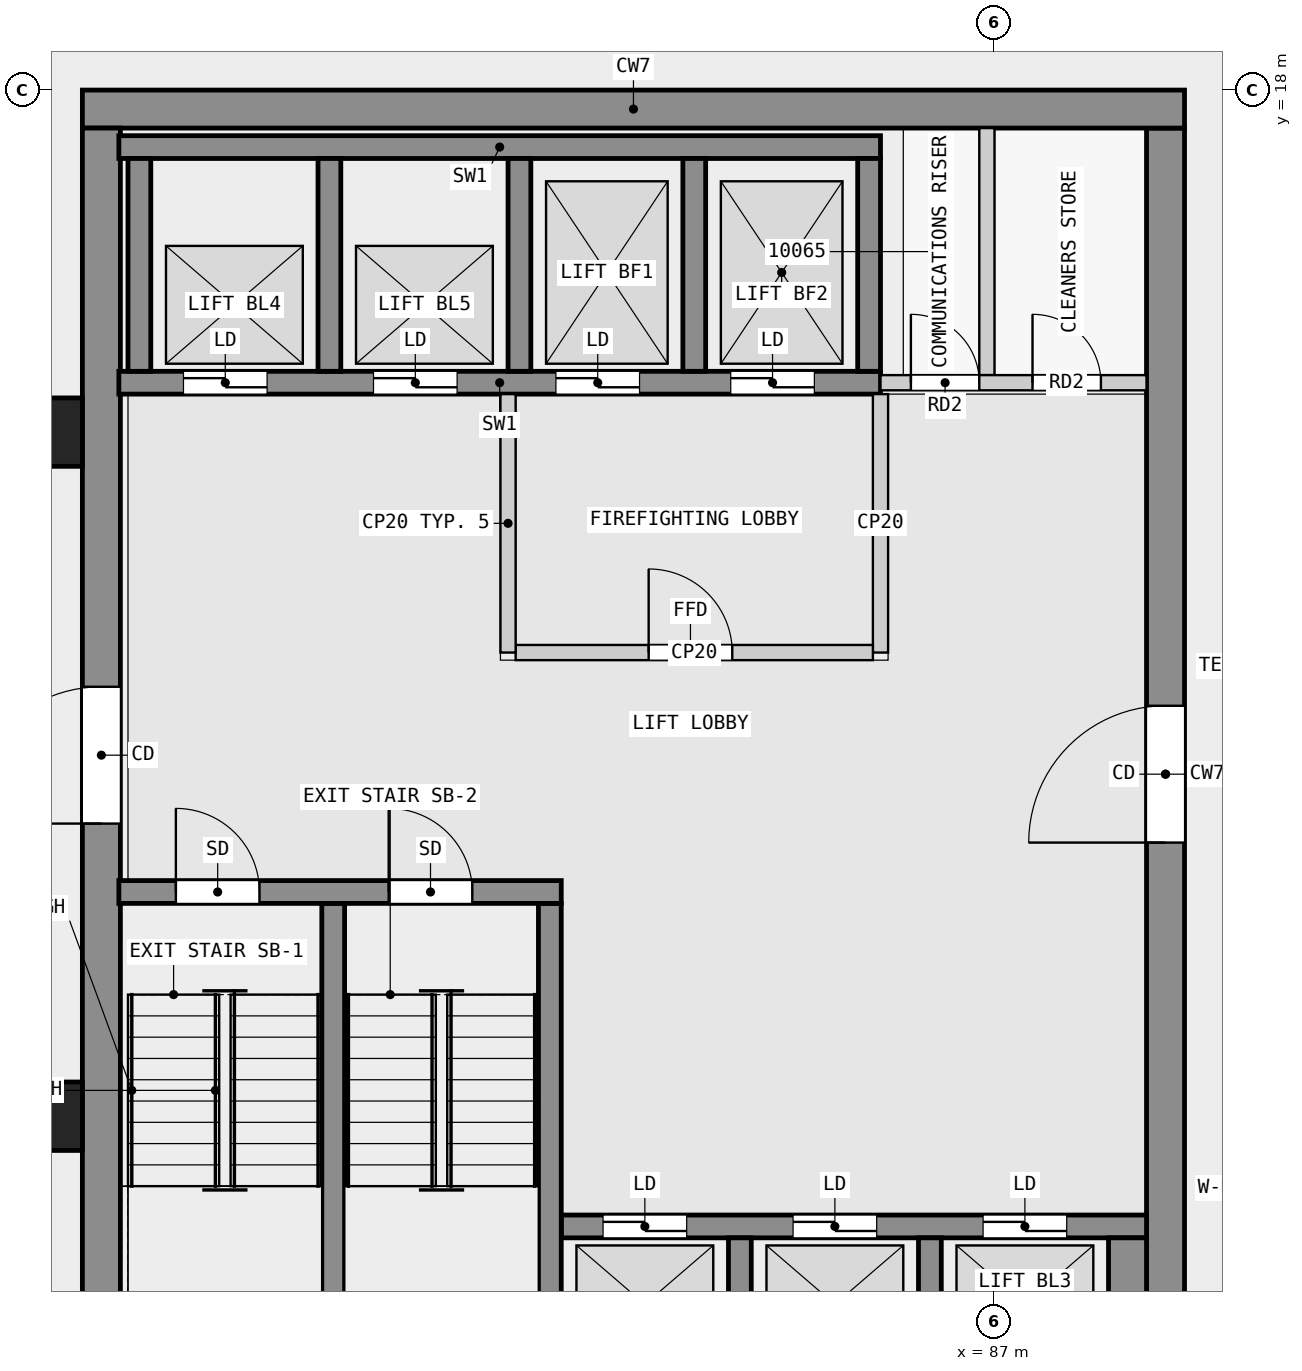
"""IFC4 building model, lengths in metres.
Left out: names, types, materials, properties, quantities, classifications, styles, units other than length and angle.
Written with IfcOpenShell. Run it as: python <this file> out.ifc"""

import sys

from ifc_helpers import new_model, si_unit, direction, frame, frame_2d, origin, origin_2d, place, context, subcontext, project, spatial, rectangle, extrude, element, fill, save


model = new_model("IFC4")
c1 = context("Model", 3, precision=1e-05, world=origin(), true_north=direction((0.0, 1.0)))
c2 = subcontext(c1, "Body", "Model", "MODEL_VIEW")
j1 = project(units=[si_unit("LENGTHUNIT", "METRE"), si_unit("PLANEANGLEUNIT", "RADIAN")], contexts=[c1])
p1 = place(None, origin())
s1 = spatial("IfcSite", under=j1, at=p1, CompositionType="ELEMENT")
p2 = place(p1, origin())
s2 = spatial("IfcBuilding", under=s1, at=p2, CompositionType="ELEMENT")
p3 = place(p2, frame((0.0, 0.0, 44.3)))
s3 = spatial("IfcBuildingStorey", under=s2, at=p3, CompositionType="ELEMENT", Elevation=44.3)
for number, where, z_axis, x_axis in (
    (1, (74.55, 13.5, 0.0), (0.0, 0.0, 1.0), (1.0, 0.0, 0.0)),
    (2, (74.55, 4.5, 0.0), (0.0, 0.0, 1.0), (1.0, 0.0, 0.0)),
):
    element("IfcColumn", number, at=place(p3, frame(where, z_axis=z_axis, x_axis=x_axis)), inside=s3, PredefinedType="COLUMN", context=c2, shape_type="SweptSolid", body=[
        extrude(rectangle(XDim=0.9, YDim=0.9, at=origin_2d()), origin(), (0.0, 0.0, 1.0), 3.5),
    ])
p4 = place(p3, frame((75.0, 17.75, 0.0), z_axis=(0.0, 0.0, 1.0), x_axis=(1.0, 0.0, 0.0)))
e3 = element("IfcWall", 3, at=p4, inside=s3, PredefinedType="SHEAR", context=c2, shape_type="SweptSolid", body=[
    extrude(rectangle(XDim=14.5, YDim=0.5, at=frame_2d((7.25, 0.0))), origin(), (0.0, 0.0, 1.0), 3.25),
])
p5 = place(p3, frame((75.25, 0.5, 0.0), z_axis=(0.0, 0.0, 1.0), x_axis=(0.0, 1.0, 0.0)))
e4 = element("IfcWall", 4, at=p5, inside=s3, PredefinedType="SHEAR", context=c2, shape_type="SweptSolid", body=[
    extrude(rectangle(XDim=17.0, YDim=0.5, at=frame_2d((8.5, 0.0))), origin(), (0.0, 0.0, 1.0), 3.25),
])
p6 = place(p5, frame((7.85, 0.0, 0.0)))
e5 = element("IfcOpeningElement", 5, at=p6, cuts=e4, PredefinedType="OPENING", context=c2, shape_type="SweptSolid", body=[
    extrude(rectangle(XDim=1.8, YDim=2.1, at=frame_2d((0.9, 1.05))), frame((0.0, 0.26, 0.0), z_axis=(0.0, -1.0, 0.0), x_axis=(1.0, 0.0, 0.0)), (0.0, 0.0, 1.0), 0.52),
])
p7 = place(p3, frame((89.25, 0.5, 0.0), z_axis=(0.0, 0.0, 1.0), x_axis=(0.0, 1.0, 0.0)))
e6 = element("IfcWall", 6, at=p7, inside=s3, PredefinedType="SHEAR", context=c2, shape_type="SweptSolid", body=[
    extrude(rectangle(XDim=17.0, YDim=0.5, at=frame_2d((8.5, 0.0))), origin(), (0.0, 0.0, 1.0), 3.25),
])
p8 = place(p7, frame((7.6, 0.0, 0.0)))
e7 = element("IfcOpeningElement", 7, at=p8, cuts=e6, PredefinedType="OPENING", context=c2, shape_type="SweptSolid", body=[
    extrude(rectangle(XDim=1.8, YDim=2.1, at=frame_2d((0.9, 1.05))), frame((0.0, 0.26, 0.0), z_axis=(0.0, -1.0, 0.0), x_axis=(1.0, 0.0, 0.0)), (0.0, 0.0, 1.0), 0.52),
])
p9 = place(p3, frame((75.48, 7.45, 0.0), z_axis=(0.0, 0.0, 1.0), x_axis=(1.0, 0.0, 0.0)))
e8 = element("IfcWall", 8, at=p9, inside=s3, PredefinedType="SHEAR", context=c2, shape_type="SweptSolid", body=[
    extrude(rectangle(XDim=5.82, YDim=0.3, at=frame_2d((2.91, 0.0))), origin(), (0.0, 0.0, 1.0), 3.25),
])
p10 = place(p9, frame((0.75, 0.0, 0.0)))
e9 = element("IfcOpeningElement", 9, at=p10, cuts=e8, PredefinedType="OPENING", context=c2, shape_type="SweptSolid", body=[
    extrude(rectangle(XDim=1.1, YDim=2.1, at=frame_2d((0.55, 1.05))), frame((0.0, 0.16, 0.0), z_axis=(0.0, -1.0, 0.0), x_axis=(1.0, 0.0, 0.0)), (0.0, 0.0, 1.0), 0.32),
])
p11 = place(p9, frame((3.55, 0.0, 0.0)))
e10 = element("IfcOpeningElement", 10, at=p11, cuts=e8, PredefinedType="OPENING", context=c2, shape_type="SweptSolid", body=[
    extrude(rectangle(XDim=1.1, YDim=2.1, at=frame_2d((0.55, 1.05))), frame((0.0, 0.16, 0.0), z_axis=(0.0, -1.0, 0.0), x_axis=(1.0, 0.0, 0.0)), (0.0, 0.0, 1.0), 0.32),
])
for number, where, z_axis, x_axis in (
    (11, (78.3, 0.9, 0.0), (0.0, 0.0, 1.0), (0.0, 1.0, 0.0)),
    (12, (81.15, 0.9, 0.0), (0.0, 0.0, 1.0), (0.0, 1.0, 0.0)),
):
    element("IfcWall", number, at=place(p3, frame(where, z_axis=z_axis, x_axis=x_axis)), inside=s3, PredefinedType="SHEAR", context=c2, shape_type="SweptSolid", body=[
        extrude(rectangle(XDim=6.4, YDim=0.3, at=frame_2d((3.2, 0.0))), origin(), (0.0, 0.0, 1.0), 3.25),
    ])
for number, where, z_axis, x_axis in (
    (13, (83.65, 0.9, 0.0), (0.0, 0.0, 1.0), (0.0, 1.0, 0.0)),
    (14, (86.15, 0.9, 0.0), (0.0, 0.0, 1.0), (0.0, 1.0, 0.0)),
):
    element("IfcWall", number, at=place(p3, frame(where, z_axis=z_axis, x_axis=x_axis)), inside=s3, PredefinedType="SHEAR", context=c2, shape_type="SweptSolid", body=[
        extrude(rectangle(XDim=2.0, YDim=0.3, at=frame_2d((1.0, 0.0))), origin(), (0.0, 0.0, 1.0), 3.25),
    ])
p12 = place(p3, frame((88.75, 0.9, 0.0), z_axis=(0.0, 0.0, 1.0), x_axis=(0.0, 1.0, 0.0)))
e15 = element("IfcWall", 15, at=p12, inside=s3, PredefinedType="SHEAR", context=c2, shape_type="SweptSolid", body=[
    extrude(rectangle(XDim=2.0, YDim=0.5, at=frame_2d((1.0, 0.0))), origin(), (0.0, 0.0, 1.0), 3.25),
])
p13 = place(p3, frame((81.3, 3.05, 0.0), z_axis=(0.0, 0.0, 1.0), x_axis=(1.0, 0.0, 0.0)))
e16 = element("IfcWall", 16, at=p13, inside=s3, PredefinedType="SHEAR", context=c2, shape_type="SweptSolid", body=[
    extrude(rectangle(XDim=7.7, YDim=0.3, at=frame_2d((3.85, 0.0))), origin(), (0.0, 0.0, 1.0), 3.25),
])
p14 = place(p13, frame((0.55, 0.0, 0.0)))
e17 = element("IfcOpeningElement", 17, at=p14, cuts=e16, PredefinedType="OPENING", context=c2, shape_type="SweptSolid", body=[
    extrude(rectangle(XDim=1.1, YDim=2.1, at=frame_2d((0.55, 1.05))), frame((0.0, 0.16, 0.0), z_axis=(0.0, -1.0, 0.0), x_axis=(1.0, 0.0, 0.0)), (0.0, 0.0, 1.0), 0.32),
])
p15 = place(p13, frame((3.05, 0.0, 0.0)))
e18 = element("IfcOpeningElement", 18, at=p15, cuts=e16, PredefinedType="OPENING", context=c2, shape_type="SweptSolid", body=[
    extrude(rectangle(XDim=1.1, YDim=2.1, at=frame_2d((0.55, 1.05))), frame((0.0, 0.16, 0.0), z_axis=(0.0, -1.0, 0.0), x_axis=(1.0, 0.0, 0.0)), (0.0, 0.0, 1.0), 0.32),
])
p16 = place(p13, frame((5.55, 0.0, 0.0)))
e19 = element("IfcOpeningElement", 19, at=p16, cuts=e16, PredefinedType="OPENING", context=c2, shape_type="SweptSolid", body=[
    extrude(rectangle(XDim=1.1, YDim=2.1, at=frame_2d((0.55, 1.05))), frame((0.0, 0.16, 0.0), z_axis=(0.0, -1.0, 0.0), x_axis=(1.0, 0.0, 0.0)), (0.0, 0.0, 1.0), 0.32),
])
p17 = place(p3, frame((75.48, 17.25, 0.0), z_axis=(0.0, 0.0, 1.0), x_axis=(1.0, 0.0, 0.0)))
e20 = element("IfcWall", 20, at=p17, inside=s3, PredefinedType="SHEAR", context=c2, shape_type="SweptSolid", body=[
    extrude(rectangle(XDim=10.02, YDim=0.3, at=frame_2d((5.01, 0.0))), origin(), (0.0, 0.0, 1.0), 3.25),
])
p18 = place(p3, frame((75.48, 14.15, 0.0), z_axis=(0.0, 0.0, 1.0), x_axis=(1.0, 0.0, 0.0)))
e21 = element("IfcWall", 21, at=p18, inside=s3, PredefinedType="SHEAR", context=c2, shape_type="SweptSolid", body=[
    extrude(rectangle(XDim=10.02, YDim=0.3, at=frame_2d((5.01, 0.0))), origin(), (0.0, 0.0, 1.0), 3.25),
])
p19 = place(p18, frame((0.85, 0.0, 0.0)))
e22 = element("IfcOpeningElement", 22, at=p19, cuts=e21, PredefinedType="OPENING", context=c2, shape_type="SweptSolid", body=[
    extrude(rectangle(XDim=1.1, YDim=2.1, at=frame_2d((0.55, 1.05))), frame((0.0, 0.16, 0.0), z_axis=(0.0, -1.0, 0.0), x_axis=(1.0, 0.0, 0.0)), (0.0, 0.0, 1.0), 0.32),
])
p20 = place(p18, frame((3.35, 0.0, 0.0)))
e23 = element("IfcOpeningElement", 23, at=p20, cuts=e21, PredefinedType="OPENING", context=c2, shape_type="SweptSolid", body=[
    extrude(rectangle(XDim=1.1, YDim=2.1, at=frame_2d((0.55, 1.05))), frame((0.0, 0.16, 0.0), z_axis=(0.0, -1.0, 0.0), x_axis=(1.0, 0.0, 0.0)), (0.0, 0.0, 1.0), 0.32),
])
p21 = place(p18, frame((5.75, 0.0, 0.0)))
e24 = element("IfcOpeningElement", 24, at=p21, cuts=e21, PredefinedType="OPENING", context=c2, shape_type="SweptSolid", body=[
    extrude(rectangle(XDim=1.1, YDim=2.1, at=frame_2d((0.55, 1.05))), frame((0.0, 0.16, 0.0), z_axis=(0.0, -1.0, 0.0), x_axis=(1.0, 0.0, 0.0)), (0.0, 0.0, 1.0), 0.32),
])
p22 = place(p18, frame((8.05, 0.0, 0.0)))
e25 = element("IfcOpeningElement", 25, at=p22, cuts=e21, PredefinedType="OPENING", context=c2, shape_type="SweptSolid", body=[
    extrude(rectangle(XDim=1.1, YDim=2.1, at=frame_2d((0.55, 1.05))), frame((0.0, 0.16, 0.0), z_axis=(0.0, -1.0, 0.0), x_axis=(1.0, 0.0, 0.0)), (0.0, 0.0, 1.0), 0.32),
])
for number, where, z_axis, x_axis in (
    (26, (75.75, 14.3, 0.0), (0.0, 0.0, 1.0), (0.0, 1.0, 0.0)),
    (27, (78.25, 14.3, 0.0), (0.0, 0.0, 1.0), (0.0, 1.0, 0.0)),
    (28, (80.75, 14.3, 0.0), (0.0, 0.0, 1.0), (0.0, 1.0, 0.0)),
    (29, (83.05, 14.3, 0.0), (0.0, 0.0, 1.0), (0.0, 1.0, 0.0)),
    (30, (85.35, 14.3, 0.0), (0.0, 0.0, 1.0), (0.0, 1.0, 0.0)),
):
    element("IfcWall", number, at=place(p3, frame(where, z_axis=z_axis, x_axis=x_axis)), inside=s3, PredefinedType="SHEAR", context=c2, shape_type="SweptSolid", body=[
        extrude(rectangle(XDim=2.8, YDim=0.3, at=frame_2d((1.4, 0.0))), origin(), (0.0, 0.0, 1.0), 3.25),
    ])
p23 = place(p3, frame((80.6, 10.6, 0.0), z_axis=(0.0, 0.0, 1.0), x_axis=(0.0, 1.0, 0.0)))
e31 = element("IfcWall", 31, at=p23, inside=s3, PredefinedType="PARTITIONING", context=c2, shape_type="SweptSolid", body=[
    extrude(rectangle(XDim=3.4, YDim=0.2, at=frame_2d((1.7, 0.0))), origin(), (0.0, 0.0, 1.0), 3.25),
])
p24 = place(p3, frame((80.7, 10.6, 0.0), z_axis=(0.0, 0.0, 1.0), x_axis=(1.0, 0.0, 0.0)))
e32 = element("IfcWall", 32, at=p24, inside=s3, PredefinedType="PARTITIONING", context=c2, shape_type="SweptSolid", body=[
    extrude(rectangle(XDim=4.7, YDim=0.2, at=frame_2d((2.35, 0.0))), origin(), (0.0, 0.0, 1.0), 3.25),
])
p25 = place(p24, frame((1.75, 0.0, 0.0)))
e33 = element("IfcOpeningElement", 33, at=p25, cuts=e32, PredefinedType="OPENING", context=c2, shape_type="SweptSolid", body=[
    extrude(rectangle(XDim=1.1, YDim=2.1, at=frame_2d((0.55, 1.05))), frame((0.0, 0.11, 0.0), z_axis=(0.0, -1.0, 0.0), x_axis=(1.0, 0.0, 0.0)), (0.0, 0.0, 1.0), 0.22),
])
p26 = place(p3, frame((85.5, 10.6, 0.0), z_axis=(0.0, 0.0, 1.0), x_axis=(0.0, 1.0, 0.0)))
e34 = element("IfcWall", 34, at=p26, inside=s3, PredefinedType="PARTITIONING", context=c2, shape_type="SweptSolid", body=[
    extrude(rectangle(XDim=3.4, YDim=0.2, at=frame_2d((1.7, 0.0))), origin(), (0.0, 0.0, 1.0), 3.25),
])
p27 = place(p3, frame((85.5, 14.15, 0.0), z_axis=(0.0, 0.0, 1.0), x_axis=(1.0, 0.0, 0.0)))
e35 = element("IfcWall", 35, at=p27, inside=s3, PredefinedType="PARTITIONING", context=c2, shape_type="SweptSolid", body=[
    extrude(rectangle(XDim=3.5, YDim=0.2, at=frame_2d((1.75, 0.0))), origin(), (0.0, 0.0, 1.0), 3.25),
])
p28 = place(p27, frame((0.4, 0.0, 0.0)))
e36 = element("IfcOpeningElement", 36, at=p28, cuts=e35, PredefinedType="OPENING", context=c2, shape_type="SweptSolid", body=[
    extrude(rectangle(XDim=0.9, YDim=2.1, at=frame_2d((0.45, 1.05))), frame((0.0, 0.11, 0.0), z_axis=(0.0, -1.0, 0.0), x_axis=(1.0, 0.0, 0.0)), (0.0, 0.0, 1.0), 0.22),
])
p29 = place(p27, frame((2.0, 0.0, 0.0)))
e37 = element("IfcOpeningElement", 37, at=p29, cuts=e35, PredefinedType="OPENING", context=c2, shape_type="SweptSolid", body=[
    extrude(rectangle(XDim=0.9, YDim=2.1, at=frame_2d((0.45, 1.05))), frame((0.0, 0.11, 0.0), z_axis=(0.0, -1.0, 0.0), x_axis=(1.0, 0.0, 0.0)), (0.0, 0.0, 1.0), 0.22),
])
p30 = place(p3, frame((86.9, 14.25, 0.0), z_axis=(0.0, 0.0, 1.0), x_axis=(0.0, 1.0, 0.0)))
e38 = element("IfcWall", 38, at=p30, inside=s3, PredefinedType="PARTITIONING", context=c2, shape_type="SweptSolid", body=[
    extrude(rectangle(XDim=3.25, YDim=0.2, at=frame_2d((1.625, 0.0))), origin(), (0.0, 0.0, 1.0), 3.25),
])
p31 = place(p25, origin())
e39 = element("IfcDoor", 39, at=p31, inside=s3, OperationType="SINGLE_SWING_LEFT", PredefinedType="DOOR", context=c2, shape_type="SweptSolid", body=[
    extrude(rectangle(XDim=1.1, YDim=2.1, at=frame_2d((0.55, 1.05))), frame((0.0, 0.025, 0.0), z_axis=(0.0, -1.0, 0.0), x_axis=(1.0, 0.0, 0.0)), (0.0, 0.0, 1.0), 0.05),
])
fill(e33, e39)
p32 = place(p14, origin())
e40 = element("IfcDoor", 40, at=p32, inside=s3, OperationType="DOUBLE_DOOR_SLIDING", PredefinedType="DOOR", context=c2, shape_type="SweptSolid", body=[
    extrude(rectangle(XDim=1.1, YDim=2.1, at=frame_2d((0.55, 1.05))), frame((0.0, 0.025, 0.0), z_axis=(0.0, -1.0, 0.0), x_axis=(1.0, 0.0, 0.0)), (0.0, 0.0, 1.0), 0.05),
])
fill(e17, e40)
p33 = place(p15, origin())
e41 = element("IfcDoor", 41, at=p33, inside=s3, OperationType="DOUBLE_DOOR_SLIDING", PredefinedType="DOOR", context=c2, shape_type="SweptSolid", body=[
    extrude(rectangle(XDim=1.1, YDim=2.1, at=frame_2d((0.55, 1.05))), frame((0.0, 0.025, 0.0), z_axis=(0.0, -1.0, 0.0), x_axis=(1.0, 0.0, 0.0)), (0.0, 0.0, 1.0), 0.05),
])
fill(e18, e41)
p34 = place(p16, origin())
e42 = element("IfcDoor", 42, at=p34, inside=s3, OperationType="DOUBLE_DOOR_SLIDING", PredefinedType="DOOR", context=c2, shape_type="SweptSolid", body=[
    extrude(rectangle(XDim=1.1, YDim=2.1, at=frame_2d((0.55, 1.05))), frame((0.0, 0.025, 0.0), z_axis=(0.0, -1.0, 0.0), x_axis=(1.0, 0.0, 0.0)), (0.0, 0.0, 1.0), 0.05),
])
fill(e19, e42)
p35 = place(p19, origin())
e43 = element("IfcDoor", 43, at=p35, inside=s3, OperationType="DOUBLE_DOOR_SLIDING", PredefinedType="DOOR", context=c2, shape_type="SweptSolid", body=[
    extrude(rectangle(XDim=1.1, YDim=2.1, at=frame_2d((0.55, 1.05))), frame((0.0, 0.025, 0.0), z_axis=(0.0, -1.0, 0.0), x_axis=(1.0, 0.0, 0.0)), (0.0, 0.0, 1.0), 0.05),
])
fill(e22, e43)
p36 = place(p20, origin())
e44 = element("IfcDoor", 44, at=p36, inside=s3, OperationType="DOUBLE_DOOR_SLIDING", PredefinedType="DOOR", context=c2, shape_type="SweptSolid", body=[
    extrude(rectangle(XDim=1.1, YDim=2.1, at=frame_2d((0.55, 1.05))), frame((0.0, 0.025, 0.0), z_axis=(0.0, -1.0, 0.0), x_axis=(1.0, 0.0, 0.0)), (0.0, 0.0, 1.0), 0.05),
])
fill(e23, e44)
p37 = place(p21, origin())
e45 = element("IfcDoor", 45, at=p37, inside=s3, OperationType="DOUBLE_DOOR_SLIDING", PredefinedType="DOOR", context=c2, shape_type="SweptSolid", body=[
    extrude(rectangle(XDim=1.1, YDim=2.1, at=frame_2d((0.55, 1.05))), frame((0.0, 0.025, 0.0), z_axis=(0.0, -1.0, 0.0), x_axis=(1.0, 0.0, 0.0)), (0.0, 0.0, 1.0), 0.05),
])
fill(e24, e45)
p38 = place(p22, origin())
e46 = element("IfcDoor", 46, at=p38, inside=s3, OperationType="DOUBLE_DOOR_SLIDING", PredefinedType="DOOR", context=c2, shape_type="SweptSolid", body=[
    extrude(rectangle(XDim=1.1, YDim=2.1, at=frame_2d((0.55, 1.05))), frame((0.0, 0.025, 0.0), z_axis=(0.0, -1.0, 0.0), x_axis=(1.0, 0.0, 0.0)), (0.0, 0.0, 1.0), 0.05),
])
fill(e25, e46)
p39 = place(p10, origin())
e47 = element("IfcDoor", 47, at=p39, inside=s3, OperationType="SINGLE_SWING_RIGHT", PredefinedType="DOOR", context=c2, shape_type="SweptSolid", body=[
    extrude(rectangle(XDim=1.1, YDim=2.1, at=frame_2d((0.55, 1.05))), frame((0.0, 0.025, 0.0), z_axis=(0.0, -1.0, 0.0), x_axis=(1.0, 0.0, 0.0)), (0.0, 0.0, 1.0), 0.05),
])
fill(e9, e47)
p40 = place(p11, origin())
e48 = element("IfcDoor", 48, at=p40, inside=s3, OperationType="SINGLE_SWING_LEFT", PredefinedType="DOOR", context=c2, shape_type="SweptSolid", body=[
    extrude(rectangle(XDim=1.1, YDim=2.1, at=frame_2d((0.55, 1.05))), frame((0.0, 0.025, 0.0), z_axis=(0.0, -1.0, 0.0), x_axis=(1.0, 0.0, 0.0)), (0.0, 0.0, 1.0), 0.05),
])
fill(e10, e48)
p41 = place(p6, origin())
e49 = element("IfcDoor", 49, at=p41, inside=s3, OperationType="DOUBLE_DOOR_SINGLE_SWING", PredefinedType="DOOR", context=c2, shape_type="SweptSolid", body=[
    extrude(rectangle(XDim=1.8, YDim=2.1, at=frame_2d((0.9, 1.05))), frame((0.0, 0.025, 0.0), z_axis=(0.0, -1.0, 0.0), x_axis=(1.0, 0.0, 0.0)), (0.0, 0.0, 1.0), 0.05),
])
fill(e5, e49)
p42 = place(p8, origin())
e50 = element("IfcDoor", 50, at=p42, inside=s3, OperationType="DOUBLE_DOOR_SINGLE_SWING", PredefinedType="DOOR", context=c2, shape_type="SweptSolid", body=[
    extrude(rectangle(XDim=1.8, YDim=2.1, at=frame_2d((0.9, 1.05))), frame((0.0, 0.025, 0.0), z_axis=(0.0, -1.0, 0.0), x_axis=(1.0, 0.0, 0.0)), (0.0, 0.0, 1.0), 0.05),
])
fill(e7, e50)
p43 = place(p28, origin())
e51 = element("IfcDoor", 51, at=p43, inside=s3, OperationType="SINGLE_SWING_LEFT", PredefinedType="DOOR", context=c2, shape_type="SweptSolid", body=[
    extrude(rectangle(XDim=0.9, YDim=2.1, at=frame_2d((0.45, 1.05))), frame((0.0, 0.025, 0.0), z_axis=(0.0, -1.0, 0.0), x_axis=(1.0, 0.0, 0.0)), (0.0, 0.0, 1.0), 0.05),
])
fill(e36, e51)
p44 = place(p29, origin())
e52 = element("IfcDoor", 52, at=p44, inside=s3, OperationType="SINGLE_SWING_LEFT", PredefinedType="DOOR", context=c2, shape_type="SweptSolid", body=[
    extrude(rectangle(XDim=0.9, YDim=2.1, at=frame_2d((0.45, 1.05))), frame((0.0, 0.025, 0.0), z_axis=(0.0, -1.0, 0.0), x_axis=(1.0, 0.0, 0.0)), (0.0, 0.0, 1.0), 0.05),
])
fill(e37, e52)
save(model, sys.argv[1])
